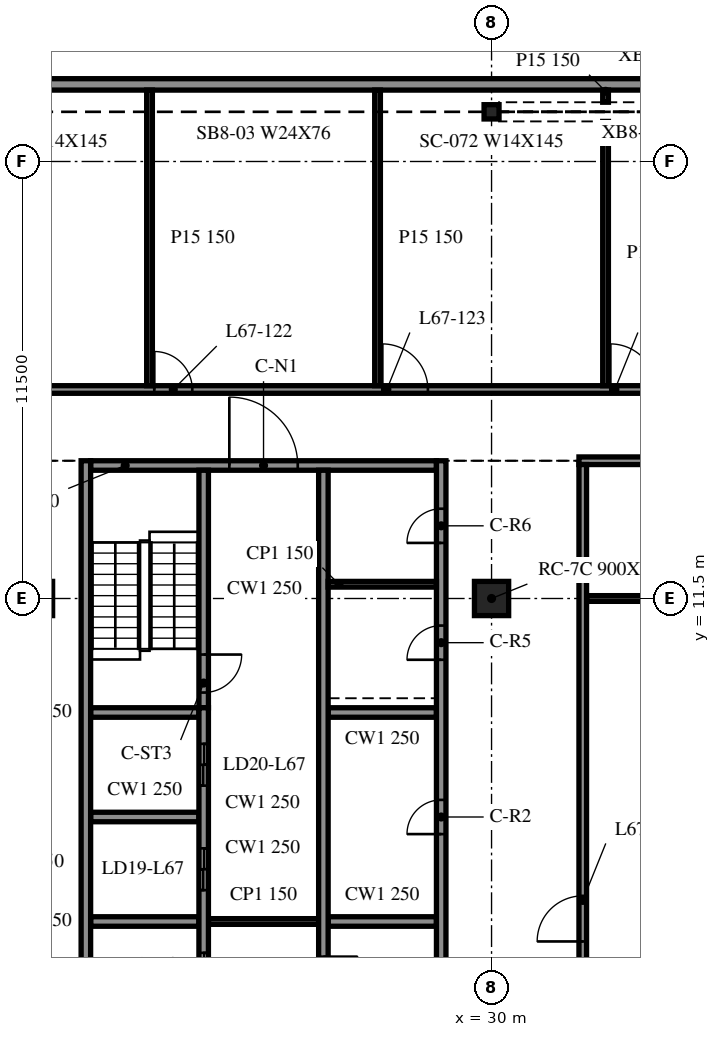
"""IFC4 building model, lengths in metres.
Left out: names, types, materials, properties, quantities, classifications, styles, units other than length and angle.
Written with IfcOpenShell. Run it as: python <this file> out.ifc"""

import sys

from ifc_helpers import new_model, si_unit, direction, frame, frame_2d, origin, origin_2d, place, context, subcontext, project, spatial, rectangle, i_section, extrude, element, fill, save


model = new_model("IFC4")
c1 = context("Model", 3, precision=1e-05, world=origin(), true_north=direction((0.0, 1.0)))
c2 = subcontext(c1, "Body", "Model", "MODEL_VIEW")
j1 = project(units=[si_unit("LENGTHUNIT", "METRE"), si_unit("PLANEANGLEUNIT", "RADIAN")], contexts=[c1])
p1 = place(None, origin())
s1 = spatial("IfcSite", under=j1, at=p1, CompositionType="ELEMENT")
p2 = place(p1, origin())
s2 = spatial("IfcBuilding", under=s1, at=p2, CompositionType="ELEMENT")
p3 = place(p2, frame((0.0, 0.0, 274.7)))
s3 = spatial("IfcBuildingStorey", under=s2, at=p3, CompositionType="ELEMENT", Elevation=274.7)
p4 = place(p3, frame((30.0, 11.5, -0.34), z_axis=(0.0, 0.0, 1.0), x_axis=(1.0, 0.0, 0.0)))
e1 = element("IfcColumn", 1, at=p4, inside=s3, PredefinedType="COLUMN", context=c2, shape_type="SweptSolid", body=[
    extrude(rectangle(XDim=0.9, YDim=0.9, at=origin_2d()), origin(), (0.0, 0.0, 1.0), 3.8),
])
p5 = place(p3, frame((30.0, 24.307, -0.34), z_axis=(0.0, 0.0, 1.0), x_axis=(1.0, 0.0, 0.0)))
e2 = element("IfcColumn", 2, at=p5, inside=s3, PredefinedType="COLUMN", context=c2, shape_type="SweptSolid", body=[
    extrude(i_section(OverallWidth=0.394, OverallDepth=0.376, WebThickness=0.017, FlangeThickness=0.028, at=origin_2d()), origin(), (0.0, 0.0, 1.0), 3.8),
])
p6 = place(p3, frame((42.0, 25.029, 0.0), z_axis=(0.0, 0.0, 1.0), x_axis=(-1.0, 0.0, 0.0)))
e3 = element("IfcWall", 3, at=p6, inside=s3, PredefinedType="NOTDEFINED", context=c2, shape_type="SweptSolid", body=[
    extrude(rectangle(XDim=84.0, YDim=0.3, at=frame_2d((42.0, 0.0))), origin(), (0.0, 0.0, 1.0), 2.853),
])
p7 = place(p3, frame((19.325, 15.125, 0.0), z_axis=(0.0, 0.0, 1.0), x_axis=(0.0, -1.0, 0.0)))
e4 = element("IfcWall", 4, at=p7, inside=s3, PredefinedType="SOLIDWALL", context=c2, shape_type="SweptSolid", body=[
    extrude(rectangle(XDim=24.25, YDim=0.25, at=frame_2d((12.125, 0.0))), origin(), (0.0, 0.0, 1.0), 3.46),
])
p8 = place(p3, frame((28.675, -9.125, 0.0), z_axis=(0.0, 0.0, 1.0), x_axis=(0.0, 1.0, 0.0)))
e5 = element("IfcWall", 5, at=p8, inside=s3, PredefinedType="SOLIDWALL", context=c2, shape_type="SweptSolid", body=[
    extrude(rectangle(XDim=24.25, YDim=0.25, at=frame_2d((12.125, 0.0))), origin(), (0.0, 0.0, 1.0), 3.46),
])
p9 = place(p8, frame((14.425, 0.0, 0.0)))
e6 = element("IfcOpeningElement", 6, at=p9, cuts=e5, PredefinedType="OPENING", context=c2, shape_type="SweptSolid", body=[
    extrude(rectangle(XDim=0.9, YDim=2.1, at=frame_2d((0.45, 1.05))), frame((0.0, 0.135, 0.0), z_axis=(0.0, -1.0, 0.0), x_axis=(1.0, 0.0, 0.0)), (0.0, 0.0, 1.0), 0.27),
])
p10 = place(p8, frame((19.012, 0.0, 0.0)))
e7 = element("IfcOpeningElement", 7, at=p10, cuts=e5, PredefinedType="OPENING", context=c2, shape_type="SweptSolid", body=[
    extrude(rectangle(XDim=0.9, YDim=2.1, at=frame_2d((0.45, 1.05))), frame((0.0, 0.135, 0.0), z_axis=(0.0, -1.0, 0.0), x_axis=(1.0, 0.0, 0.0)), (0.0, 0.0, 1.0), 0.27),
])
p11 = place(p8, frame((22.087, 0.0, 0.0)))
e8 = element("IfcOpeningElement", 8, at=p11, cuts=e5, PredefinedType="OPENING", context=c2, shape_type="SweptSolid", body=[
    extrude(rectangle(XDim=0.9, YDim=2.1, at=frame_2d((0.45, 1.05))), frame((0.0, 0.135, 0.0), z_axis=(0.0, -1.0, 0.0), x_axis=(1.0, 0.0, 0.0)), (0.0, 0.0, 1.0), 0.27),
])
p12 = place(p3, frame((19.45, 15.0, 0.0), z_axis=(0.0, 0.0, 1.0), x_axis=(1.0, 0.0, 0.0)))
e9 = element("IfcWall", 9, at=p12, inside=s3, PredefinedType="SOLIDWALL", context=c2, shape_type="SweptSolid", body=[
    extrude(rectangle(XDim=9.1, YDim=0.25, at=frame_2d((4.55, 0.0))), origin(), (0.0, 0.0, 1.0), 3.46),
])
p13 = place(p12, frame((3.65, 0.0, 0.0)))
e10 = element("IfcOpeningElement", 10, at=p13, cuts=e9, PredefinedType="OPENING", context=c2, shape_type="SweptSolid", body=[
    extrude(rectangle(XDim=1.8, YDim=2.1, at=frame_2d((0.9, 1.05))), frame((0.0, 0.135, 0.0), z_axis=(0.0, -1.0, 0.0), x_axis=(1.0, 0.0, 0.0)), (0.0, 0.0, 1.0), 0.27),
])
p14 = place(p3, frame((22.425, -8.875, 0.0), z_axis=(0.0, 0.0, 1.0), x_axis=(0.0, 1.0, 0.0)))
e11 = element("IfcWall", 11, at=p14, inside=s3, PredefinedType="SOLIDWALL", context=c2, shape_type="SweptSolid", body=[
    extrude(rectangle(XDim=17.5, YDim=0.25, at=frame_2d((8.75, 0.0))), origin(), (0.0, 0.0, 1.0), 3.46),
])
p15 = place(p14, frame((7.2, 0.0, 0.0)))
e12 = element("IfcOpeningElement", 12, at=p15, cuts=e11, PredefinedType="OPENING", context=c2, shape_type="SweptSolid", body=[
    extrude(rectangle(XDim=1.1, YDim=2.1, at=frame_2d((0.55, 1.05))), frame((0.0, 0.135, 0.0), z_axis=(0.0, -1.0, 0.0), x_axis=(1.0, 0.0, 0.0)), (0.0, 0.0, 1.0), 0.27),
])
p16 = place(p14, frame((9.95, 0.0, 0.0)))
e13 = element("IfcOpeningElement", 13, at=p16, cuts=e11, PredefinedType="OPENING", context=c2, shape_type="SweptSolid", body=[
    extrude(rectangle(XDim=1.1, YDim=2.1, at=frame_2d((0.55, 1.05))), frame((0.0, 0.135, 0.0), z_axis=(0.0, -1.0, 0.0), x_axis=(1.0, 0.0, 0.0)), (0.0, 0.0, 1.0), 0.27),
])
p17 = place(p14, frame((12.7, 0.0, 0.0)))
e14 = element("IfcOpeningElement", 14, at=p17, cuts=e11, PredefinedType="OPENING", context=c2, shape_type="SweptSolid", body=[
    extrude(rectangle(XDim=1.1, YDim=2.1, at=frame_2d((0.55, 1.05))), frame((0.0, 0.135, 0.0), z_axis=(0.0, -1.0, 0.0), x_axis=(1.0, 0.0, 0.0)), (0.0, 0.0, 1.0), 0.27),
])
p18 = place(p14, frame((15.45, 0.0, 0.0)))
e15 = element("IfcOpeningElement", 15, at=p18, cuts=e11, PredefinedType="OPENING", context=c2, shape_type="SweptSolid", body=[
    extrude(rectangle(XDim=1.1, YDim=2.1, at=frame_2d((0.55, 1.05))), frame((0.0, 0.135, 0.0), z_axis=(0.0, -1.0, 0.0), x_axis=(1.0, 0.0, 0.0)), (0.0, 0.0, 1.0), 0.27),
])
p19 = place(p14, frame((0.712, 0.0, 0.0)))
e16 = element("IfcOpeningElement", 16, at=p19, cuts=e11, PredefinedType="OPENING", context=c2, shape_type="SweptSolid", body=[
    extrude(rectangle(XDim=0.9, YDim=2.1, at=frame_2d((0.45, 1.05))), frame((0.0, 0.135, 0.0), z_axis=(0.0, -1.0, 0.0), x_axis=(1.0, 0.0, 0.0)), (0.0, 0.0, 1.0), 0.27),
])
p20 = place(p14, frame((3.788, 0.0, 0.0)))
e17 = element("IfcOpeningElement", 17, at=p20, cuts=e11, PredefinedType="OPENING", context=c2, shape_type="SweptSolid", body=[
    extrude(rectangle(XDim=0.9, YDim=2.1, at=frame_2d((0.45, 1.05))), frame((0.0, 0.135, 0.0), z_axis=(0.0, -1.0, 0.0), x_axis=(1.0, 0.0, 0.0)), (0.0, 0.0, 1.0), 0.27),
])
p21 = place(p3, frame((22.425, 14.875, 0.0), z_axis=(0.0, 0.0, 1.0), x_axis=(0.0, -1.0, 0.0)))
e18 = element("IfcWall", 18, at=p21, inside=s3, PredefinedType="SOLIDWALL", context=c2, shape_type="SweptSolid", body=[
    extrude(rectangle(XDim=6.25, YDim=0.25, at=frame_2d((3.125, 0.0))), origin(), (0.0, 0.0, 1.0), 3.46),
])
p22 = place(p21, frame((4.85, 0.0, 0.0)))
e19 = element("IfcOpeningElement", 19, at=p22, cuts=e18, PredefinedType="OPENING", context=c2, shape_type="SweptSolid", body=[
    extrude(rectangle(XDim=1.0, YDim=2.1, at=frame_2d((0.5, 1.05))), frame((0.0, 0.135, 0.0), z_axis=(0.0, -1.0, 0.0), x_axis=(1.0, 0.0, 0.0)), (0.0, 0.0, 1.0), 0.27),
])
p23 = place(p3, frame((25.575, 14.875, 0.0), z_axis=(0.0, 0.0, 1.0), x_axis=(0.0, -1.0, 0.0)))
e20 = element("IfcWall", 20, at=p23, inside=s3, PredefinedType="SOLIDWALL", context=c2, shape_type="SweptSolid", body=[
    extrude(rectangle(XDim=17.5, YDim=0.25, at=frame_2d((8.75, 0.0))), origin(), (0.0, 0.0, 1.0), 3.46),
])
p24 = place(p23, frame((15.45, 0.0, 0.0)))
e21 = element("IfcOpeningElement", 21, at=p24, cuts=e20, PredefinedType="OPENING", context=c2, shape_type="SweptSolid", body=[
    extrude(rectangle(XDim=1.1, YDim=2.1, at=frame_2d((0.55, 1.05))), frame((0.0, 0.135, 0.0), z_axis=(0.0, -1.0, 0.0), x_axis=(1.0, 0.0, 0.0)), (0.0, 0.0, 1.0), 0.27),
])
p25 = place(p23, frame((12.8, 0.0, 0.0)))
e22 = element("IfcOpeningElement", 22, at=p25, cuts=e20, PredefinedType="OPENING", context=c2, shape_type="SweptSolid", body=[
    extrude(rectangle(XDim=0.9, YDim=2.1, at=frame_2d((0.45, 1.05))), frame((0.0, 0.135, 0.0), z_axis=(0.0, -1.0, 0.0), x_axis=(1.0, 0.0, 0.0)), (0.0, 0.0, 1.0), 0.27),
])
for number, where, z_axis, x_axis in (
    (23, (19.45, 3.0, 0.0), (0.0, 0.0, 1.0), (1.0, 0.0, 0.0)),
    (24, (19.45, 5.75, 0.0), (0.0, 0.0, 1.0), (1.0, 0.0, 0.0)),
    (25, (19.45, 8.5, 0.0), (0.0, 0.0, 1.0), (1.0, 0.0, 0.0)),
    (26, (25.7, 3.0, 0.0), (0.0, 0.0, 1.0), (1.0, 0.0, 0.0)),
    (27, (25.7, 8.5, 0.0), (0.0, 0.0, 1.0), (1.0, 0.0, 0.0)),
):
    element("IfcWall", number, at=place(p3, frame(where, z_axis=z_axis, x_axis=x_axis)), inside=s3, PredefinedType="SOLIDWALL", context=c2, shape_type="SweptSolid", body=[
        extrude(rectangle(XDim=2.85, YDim=0.25, at=frame_2d((1.425, 0.0))), origin(), (0.0, 0.0, 1.0), 3.46),
    ])
p26 = place(p3, frame((22.55, 3.0, 0.0), z_axis=(0.0, 0.0, 1.0), x_axis=(1.0, 0.0, 0.0)))
e28 = element("IfcWall", 28, at=p26, inside=s3, PredefinedType="PARTITIONING", context=c2, shape_type="SweptSolid", body=[
    extrude(rectangle(XDim=2.9, YDim=0.15, at=frame_2d((1.45, 0.0))), origin(), (0.0, 0.0, 1.0), 3.46),
])
p27 = place(p3, frame((25.7, 11.875, 0.0), z_axis=(0.0, 0.0, 1.0), x_axis=(1.0, 0.0, 0.0)))
e29 = element("IfcWall", 29, at=p27, inside=s3, PredefinedType="PARTITIONING", context=c2, shape_type="SweptSolid", body=[
    extrude(rectangle(XDim=2.85, YDim=0.15, at=frame_2d((1.425, 0.0))), origin(), (0.0, 0.0, 1.0), 3.46),
])
p28 = place(p3, frame((32.5, 11.5, 0.0), z_axis=(0.0, 0.0, 1.0), x_axis=(1.0, 0.0, 0.0)))
e30 = element("IfcWall", 30, at=p28, inside=s3, PredefinedType="PARTITIONING", context=c2, shape_type="SweptSolid", body=[
    extrude(rectangle(XDim=9.05, YDim=0.15, at=frame_2d((4.525, 0.0))), origin(), (0.0, 0.0, 1.0), 3.46),
])
p29 = place(p3, frame((32.3, 15.125, 0.0), z_axis=(0.0, 0.0, 1.0), x_axis=(1.0, 0.0, 0.0)))
e31 = element("IfcWall", 31, at=p29, inside=s3, PredefinedType="PARTITIONING", context=c2, shape_type="SweptSolid", body=[
    extrude(rectangle(XDim=15.675, YDim=0.2, at=frame_2d((7.837, 0.0))), origin(), (0.0, 0.0, 1.0), 3.46),
])
p30 = place(p29, frame((7.3, 0.0, 0.0)))
e32 = element("IfcOpeningElement", 32, at=p30, cuts=e31, PredefinedType="OPENING", context=c2, shape_type="SweptSolid", body=[
    extrude(rectangle(XDim=1.0, YDim=2.1, at=frame_2d((0.5, 1.05))), frame((0.0, 0.11, 0.0), z_axis=(0.0, -1.0, 0.0), x_axis=(1.0, 0.0, 0.0)), (0.0, 0.0, 1.0), 0.22),
])
p31 = place(p3, frame((-47.975, 17.0, 0.0), z_axis=(0.0, 0.0, 1.0), x_axis=(1.0, 0.0, 0.0)))
e33 = element("IfcWall", 33, at=p31, inside=s3, PredefinedType="PARTITIONING", context=c2, shape_type="SweptSolid", body=[
    extrude(rectangle(XDim=95.95, YDim=0.2, at=frame_2d((47.975, 0.0))), origin(), (0.0, 0.0, 1.0), 3.46),
])
p32 = place(p31, frame((7.3, 0.0, 0.0)))
e34 = element("IfcOpeningElement", 34, at=p32, cuts=e33, PredefinedType="OPENING", context=c2, shape_type="SweptSolid", body=[
    extrude(rectangle(XDim=1.2, YDim=2.1, at=frame_2d((0.6, 1.05))), frame((0.0, 0.11, 0.0), z_axis=(0.0, -1.0, 0.0), x_axis=(1.0, 0.0, 0.0)), (0.0, 0.0, 1.0), 0.22),
])
p33 = place(p31, frame((13.3, 0.0, 0.0)))
e35 = element("IfcOpeningElement", 35, at=p33, cuts=e33, PredefinedType="OPENING", context=c2, shape_type="SweptSolid", body=[
    extrude(rectangle(XDim=1.2, YDim=2.1, at=frame_2d((0.6, 1.05))), frame((0.0, 0.11, 0.0), z_axis=(0.0, -1.0, 0.0), x_axis=(1.0, 0.0, 0.0)), (0.0, 0.0, 1.0), 0.22),
])
p34 = place(p31, frame((19.3, 0.0, 0.0)))
e36 = element("IfcOpeningElement", 36, at=p34, cuts=e33, PredefinedType="OPENING", context=c2, shape_type="SweptSolid", body=[
    extrude(rectangle(XDim=1.2, YDim=2.1, at=frame_2d((0.6, 1.05))), frame((0.0, 0.11, 0.0), z_axis=(0.0, -1.0, 0.0), x_axis=(1.0, 0.0, 0.0)), (0.0, 0.0, 1.0), 0.22),
])
p35 = place(p31, frame((28.5, 0.0, 0.0)))
e37 = element("IfcOpeningElement", 37, at=p35, cuts=e33, PredefinedType="OPENING", context=c2, shape_type="SweptSolid", body=[
    extrude(rectangle(XDim=1.0, YDim=2.1, at=frame_2d((0.5, 1.05))), frame((0.0, 0.11, 0.0), z_axis=(0.0, -1.0, 0.0), x_axis=(1.0, 0.0, 0.0)), (0.0, 0.0, 1.0), 0.22),
])
p36 = place(p31, frame((31.3, 0.0, 0.0)))
e38 = element("IfcOpeningElement", 38, at=p36, cuts=e33, PredefinedType="OPENING", context=c2, shape_type="SweptSolid", body=[
    extrude(rectangle(XDim=1.2, YDim=2.1, at=frame_2d((0.6, 1.05))), frame((0.0, 0.11, 0.0), z_axis=(0.0, -1.0, 0.0), x_axis=(1.0, 0.0, 0.0)), (0.0, 0.0, 1.0), 0.22),
])
p37 = place(p31, frame((37.5, 0.0, 0.0)))
e39 = element("IfcOpeningElement", 39, at=p37, cuts=e33, PredefinedType="OPENING", context=c2, shape_type="SweptSolid", body=[
    extrude(rectangle(XDim=1.0, YDim=2.1, at=frame_2d((0.5, 1.05))), frame((0.0, 0.11, 0.0), z_axis=(0.0, -1.0, 0.0), x_axis=(1.0, 0.0, 0.0)), (0.0, 0.0, 1.0), 0.22),
])
p38 = place(p31, frame((43.3, 0.0, 0.0)))
e40 = element("IfcOpeningElement", 40, at=p38, cuts=e33, PredefinedType="OPENING", context=c2, shape_type="SweptSolid", body=[
    extrude(rectangle(XDim=1.2, YDim=2.1, at=frame_2d((0.6, 1.05))), frame((0.0, 0.11, 0.0), z_axis=(0.0, -1.0, 0.0), x_axis=(1.0, 0.0, 0.0)), (0.0, 0.0, 1.0), 0.22),
])
p39 = place(p31, frame((47.3, 0.0, 0.0)))
e41 = element("IfcOpeningElement", 41, at=p39, cuts=e33, PredefinedType="OPENING", context=c2, shape_type="SweptSolid", body=[
    extrude(rectangle(XDim=1.2, YDim=2.1, at=frame_2d((0.6, 1.05))), frame((0.0, 0.11, 0.0), z_axis=(0.0, -1.0, 0.0), x_axis=(1.0, 0.0, 0.0)), (0.0, 0.0, 1.0), 0.22),
])
p40 = place(p31, frame((51.1, 0.0, 0.0)))
e42 = element("IfcOpeningElement", 42, at=p40, cuts=e33, PredefinedType="OPENING", context=c2, shape_type="SweptSolid", body=[
    extrude(rectangle(XDim=1.2, YDim=2.1, at=frame_2d((0.6, 1.05))), frame((0.0, 0.11, 0.0), z_axis=(0.0, -1.0, 0.0), x_axis=(1.0, 0.0, 0.0)), (0.0, 0.0, 1.0), 0.22),
])
p41 = place(p31, frame((60.1, 0.0, 0.0)))
e43 = element("IfcOpeningElement", 43, at=p41, cuts=e33, PredefinedType="OPENING", context=c2, shape_type="SweptSolid", body=[
    extrude(rectangle(XDim=1.0, YDim=2.1, at=frame_2d((0.5, 1.05))), frame((0.0, 0.11, 0.0), z_axis=(0.0, -1.0, 0.0), x_axis=(1.0, 0.0, 0.0)), (0.0, 0.0, 1.0), 0.22),
])
p42 = place(p31, frame((63.1, 0.0, 0.0)))
e44 = element("IfcOpeningElement", 44, at=p42, cuts=e33, PredefinedType="OPENING", context=c2, shape_type="SweptSolid", body=[
    extrude(rectangle(XDim=1.2, YDim=2.1, at=frame_2d((0.6, 1.05))), frame((0.0, 0.11, 0.0), z_axis=(0.0, -1.0, 0.0), x_axis=(1.0, 0.0, 0.0)), (0.0, 0.0, 1.0), 0.22),
])
p43 = place(p31, frame((69.1, 0.0, 0.0)))
e45 = element("IfcOpeningElement", 45, at=p43, cuts=e33, PredefinedType="OPENING", context=c2, shape_type="SweptSolid", body=[
    extrude(rectangle(XDim=1.0, YDim=2.1, at=frame_2d((0.5, 1.05))), frame((0.0, 0.11, 0.0), z_axis=(0.0, -1.0, 0.0), x_axis=(1.0, 0.0, 0.0)), (0.0, 0.0, 1.0), 0.22),
])
p44 = place(p31, frame((75.1, 0.0, 0.0)))
e46 = element("IfcOpeningElement", 46, at=p44, cuts=e33, PredefinedType="OPENING", context=c2, shape_type="SweptSolid", body=[
    extrude(rectangle(XDim=1.2, YDim=2.1, at=frame_2d((0.6, 1.05))), frame((0.0, 0.11, 0.0), z_axis=(0.0, -1.0, 0.0), x_axis=(1.0, 0.0, 0.0)), (0.0, 0.0, 1.0), 0.22),
])
p45 = place(p31, frame((81.1, 0.0, 0.0)))
e47 = element("IfcOpeningElement", 47, at=p45, cuts=e33, PredefinedType="OPENING", context=c2, shape_type="SweptSolid", body=[
    extrude(rectangle(XDim=1.2, YDim=2.1, at=frame_2d((0.6, 1.05))), frame((0.0, 0.11, 0.0), z_axis=(0.0, -1.0, 0.0), x_axis=(1.0, 0.0, 0.0)), (0.0, 0.0, 1.0), 0.22),
])
p46 = place(p31, frame((90.1, 0.0, 0.0)))
e48 = element("IfcOpeningElement", 48, at=p46, cuts=e33, PredefinedType="OPENING", context=c2, shape_type="SweptSolid", body=[
    extrude(rectangle(XDim=1.2, YDim=2.1, at=frame_2d((0.6, 1.05))), frame((0.0, 0.11, 0.0), z_axis=(0.0, -1.0, 0.0), x_axis=(1.0, 0.0, 0.0)), (0.0, 0.0, 1.0), 0.22),
])
for number, where, z_axis, x_axis in (
    (49, (21.0, 17.1, 0.0), (0.0, 0.0, 1.0), (0.0, 1.0, 0.0)),
    (50, (27.0, 17.1, 0.0), (0.0, 0.0, 1.0), (0.0, 1.0, 0.0)),
):
    element("IfcWall", number, at=place(p3, frame(where, z_axis=z_axis, x_axis=x_axis)), inside=s3, PredefinedType="PARTITIONING", context=c2, shape_type="SweptSolid", body=[
        extrude(rectangle(XDim=7.779, YDim=0.15, at=frame_2d((3.889, 0.0))), origin(), (0.0, 0.0, 1.0), 3.46),
    ])
p47 = place(p3, frame((32.4, -9.025, 0.0), z_axis=(0.0, 0.0, 1.0), x_axis=(0.0, 1.0, 0.0)))
e51 = element("IfcWall", 51, at=p47, inside=s3, PredefinedType="PARTITIONING", context=c2, shape_type="SweptSolid", body=[
    extrude(rectangle(XDim=24.05, YDim=0.2, at=frame_2d((12.025, 0.0))), origin(), (0.0, 0.0, 1.0), 3.46),
])
p48 = place(p47, frame((11.5, 0.0, 0.0)))
e52 = element("IfcOpeningElement", 52, at=p48, cuts=e51, PredefinedType="OPENING", context=c2, shape_type="SweptSolid", body=[
    extrude(rectangle(XDim=1.2, YDim=2.1, at=frame_2d((0.6, 1.05))), frame((0.0, 0.11, 0.0), z_axis=(0.0, -1.0, 0.0), x_axis=(1.0, 0.0, 0.0)), (0.0, 0.0, 1.0), 0.22),
])
p49 = place(p3, frame((33.0, 17.1, 0.0), z_axis=(0.0, 0.0, 1.0), x_axis=(0.0, 1.0, 0.0)))
e53 = element("IfcWall", 53, at=p49, inside=s3, PredefinedType="PARTITIONING", context=c2, shape_type="SweptSolid", body=[
    extrude(rectangle(XDim=6.955, YDim=0.15, at=frame_2d((3.477, 0.0))), origin(), (0.0, 0.0, 1.0), 3.46),
])
p50 = place(p3, frame((33.0, 24.559, 0.0), z_axis=(0.0, 0.0, 1.0), x_axis=(0.0, 1.0, 0.0)))
e54 = element("IfcWall", 54, at=p50, inside=s3, PredefinedType="PARTITIONING", context=c2, shape_type="SweptSolid", body=[
    extrude(rectangle(XDim=0.32, YDim=0.15, at=frame_2d((0.16, 0.0))), origin(), (0.0, 0.0, 1.0), 3.46),
])
p51 = place(p13, origin())
e55 = element("IfcDoor", 55, at=p51, inside=s3, OperationType="DOUBLE_DOOR_SINGLE_SWING", PredefinedType="DOOR", context=c2, shape_type="SweptSolid", body=[
    extrude(rectangle(XDim=1.8, YDim=2.1, at=frame_2d((0.9, 1.05))), frame((0.0, 0.025, 0.0), z_axis=(0.0, -1.0, 0.0), x_axis=(1.0, 0.0, 0.0)), (0.0, 0.0, 1.0), 0.05),
])
fill(e10, e55)
p52 = place(p16, origin())
e56 = element("IfcDoor", 56, at=p52, inside=s3, OperationType="DOUBLE_DOOR_SLIDING", PredefinedType="DOOR", context=c2, shape_type="SweptSolid", body=[
    extrude(rectangle(XDim=1.1, YDim=2.1, at=frame_2d((0.55, 1.05))), frame((0.0, 0.025, 0.0), z_axis=(0.0, -1.0, 0.0), x_axis=(1.0, 0.0, 0.0)), (0.0, 0.0, 1.0), 0.05),
])
fill(e13, e56)
p53 = place(p17, origin())
e57 = element("IfcDoor", 57, at=p53, inside=s3, OperationType="DOUBLE_DOOR_SLIDING", PredefinedType="DOOR", context=c2, shape_type="SweptSolid", body=[
    extrude(rectangle(XDim=1.1, YDim=2.1, at=frame_2d((0.55, 1.05))), frame((0.0, 0.025, 0.0), z_axis=(0.0, -1.0, 0.0), x_axis=(1.0, 0.0, 0.0)), (0.0, 0.0, 1.0), 0.05),
])
fill(e14, e57)
p54 = place(p18, origin())
e58 = element("IfcDoor", 58, at=p54, inside=s3, OperationType="DOUBLE_DOOR_SLIDING", PredefinedType="DOOR", context=c2, shape_type="SweptSolid", body=[
    extrude(rectangle(XDim=1.1, YDim=2.1, at=frame_2d((0.55, 1.05))), frame((0.0, 0.025, 0.0), z_axis=(0.0, -1.0, 0.0), x_axis=(1.0, 0.0, 0.0)), (0.0, 0.0, 1.0), 0.05),
])
fill(e15, e58)
p55 = place(p9, origin())
e59 = element("IfcDoor", 59, at=p55, inside=s3, OperationType="SINGLE_SWING_RIGHT", PredefinedType="DOOR", context=c2, shape_type="SweptSolid", body=[
    extrude(rectangle(XDim=0.9, YDim=2.1, at=frame_2d((0.45, 1.05))), frame((0.0, 0.025, 0.0), z_axis=(0.0, -1.0, 0.0), x_axis=(1.0, 0.0, 0.0)), (0.0, 0.0, 1.0), 0.05),
])
fill(e6, e59)
p56 = place(p10, origin())
e60 = element("IfcDoor", 60, at=p56, inside=s3, OperationType="SINGLE_SWING_LEFT", PredefinedType="DOOR", context=c2, shape_type="SweptSolid", body=[
    extrude(rectangle(XDim=0.9, YDim=2.1, at=frame_2d((0.45, 1.05))), frame((0.0, 0.025, 0.0), z_axis=(0.0, -1.0, 0.0), x_axis=(1.0, 0.0, 0.0)), (0.0, 0.0, 1.0), 0.05),
])
fill(e7, e60)
p57 = place(p11, origin())
e61 = element("IfcDoor", 61, at=p57, inside=s3, OperationType="SINGLE_SWING_RIGHT", PredefinedType="DOOR", context=c2, shape_type="SweptSolid", body=[
    extrude(rectangle(XDim=0.9, YDim=2.1, at=frame_2d((0.45, 1.05))), frame((0.0, 0.025, 0.0), z_axis=(0.0, -1.0, 0.0), x_axis=(1.0, 0.0, 0.0)), (0.0, 0.0, 1.0), 0.05),
])
fill(e8, e61)
p58 = place(p22, origin())
e62 = element("IfcDoor", 62, at=p58, inside=s3, OperationType="SINGLE_SWING_LEFT", PredefinedType="DOOR", context=c2, shape_type="SweptSolid", body=[
    extrude(rectangle(XDim=1.0, YDim=2.1, at=frame_2d((0.5, 1.05))), frame((0.0, 0.025, 0.0), z_axis=(0.0, -1.0, 0.0), x_axis=(1.0, 0.0, 0.0)), (0.0, 0.0, 1.0), 0.05),
])
fill(e19, e62)
p59 = place(p48, origin())
e63 = element("IfcDoor", 63, at=p59, inside=s3, OperationType="SINGLE_SWING_LEFT", PredefinedType="DOOR", context=c2, shape_type="SweptSolid", body=[
    extrude(rectangle(XDim=1.2, YDim=2.1, at=frame_2d((0.6, 1.05))), frame((0.0, 0.025, 0.0), z_axis=(0.0, -1.0, 0.0), x_axis=(1.0, 0.0, 0.0)), (0.0, 0.0, 1.0), 0.05),
])
fill(e52, e63)
p60 = place(p43, origin())
e64 = element("IfcDoor", 64, at=p60, inside=s3, OperationType="SINGLE_SWING_RIGHT", PredefinedType="DOOR", context=c2, shape_type="SweptSolid", body=[
    extrude(rectangle(XDim=1.0, YDim=2.1, at=frame_2d((0.5, 1.05))), frame((0.0, 0.025, 0.0), z_axis=(0.0, -1.0, 0.0), x_axis=(1.0, 0.0, 0.0)), (0.0, 0.0, 1.0), 0.05),
])
fill(e45, e64)
p61 = place(p44, origin())
e65 = element("IfcDoor", 65, at=p61, inside=s3, OperationType="SINGLE_SWING_RIGHT", PredefinedType="DOOR", context=c2, shape_type="SweptSolid", body=[
    extrude(rectangle(XDim=1.2, YDim=2.1, at=frame_2d((0.6, 1.05))), frame((0.0, 0.025, 0.0), z_axis=(0.0, -1.0, 0.0), x_axis=(1.0, 0.0, 0.0)), (0.0, 0.0, 1.0), 0.05),
])
fill(e46, e65)
p62 = place(p45, origin())
e66 = element("IfcDoor", 66, at=p62, inside=s3, OperationType="SINGLE_SWING_RIGHT", PredefinedType="DOOR", context=c2, shape_type="SweptSolid", body=[
    extrude(rectangle(XDim=1.2, YDim=2.1, at=frame_2d((0.6, 1.05))), frame((0.0, 0.025, 0.0), z_axis=(0.0, -1.0, 0.0), x_axis=(1.0, 0.0, 0.0)), (0.0, 0.0, 1.0), 0.05),
])
fill(e47, e66)
save(model, sys.argv[1])
